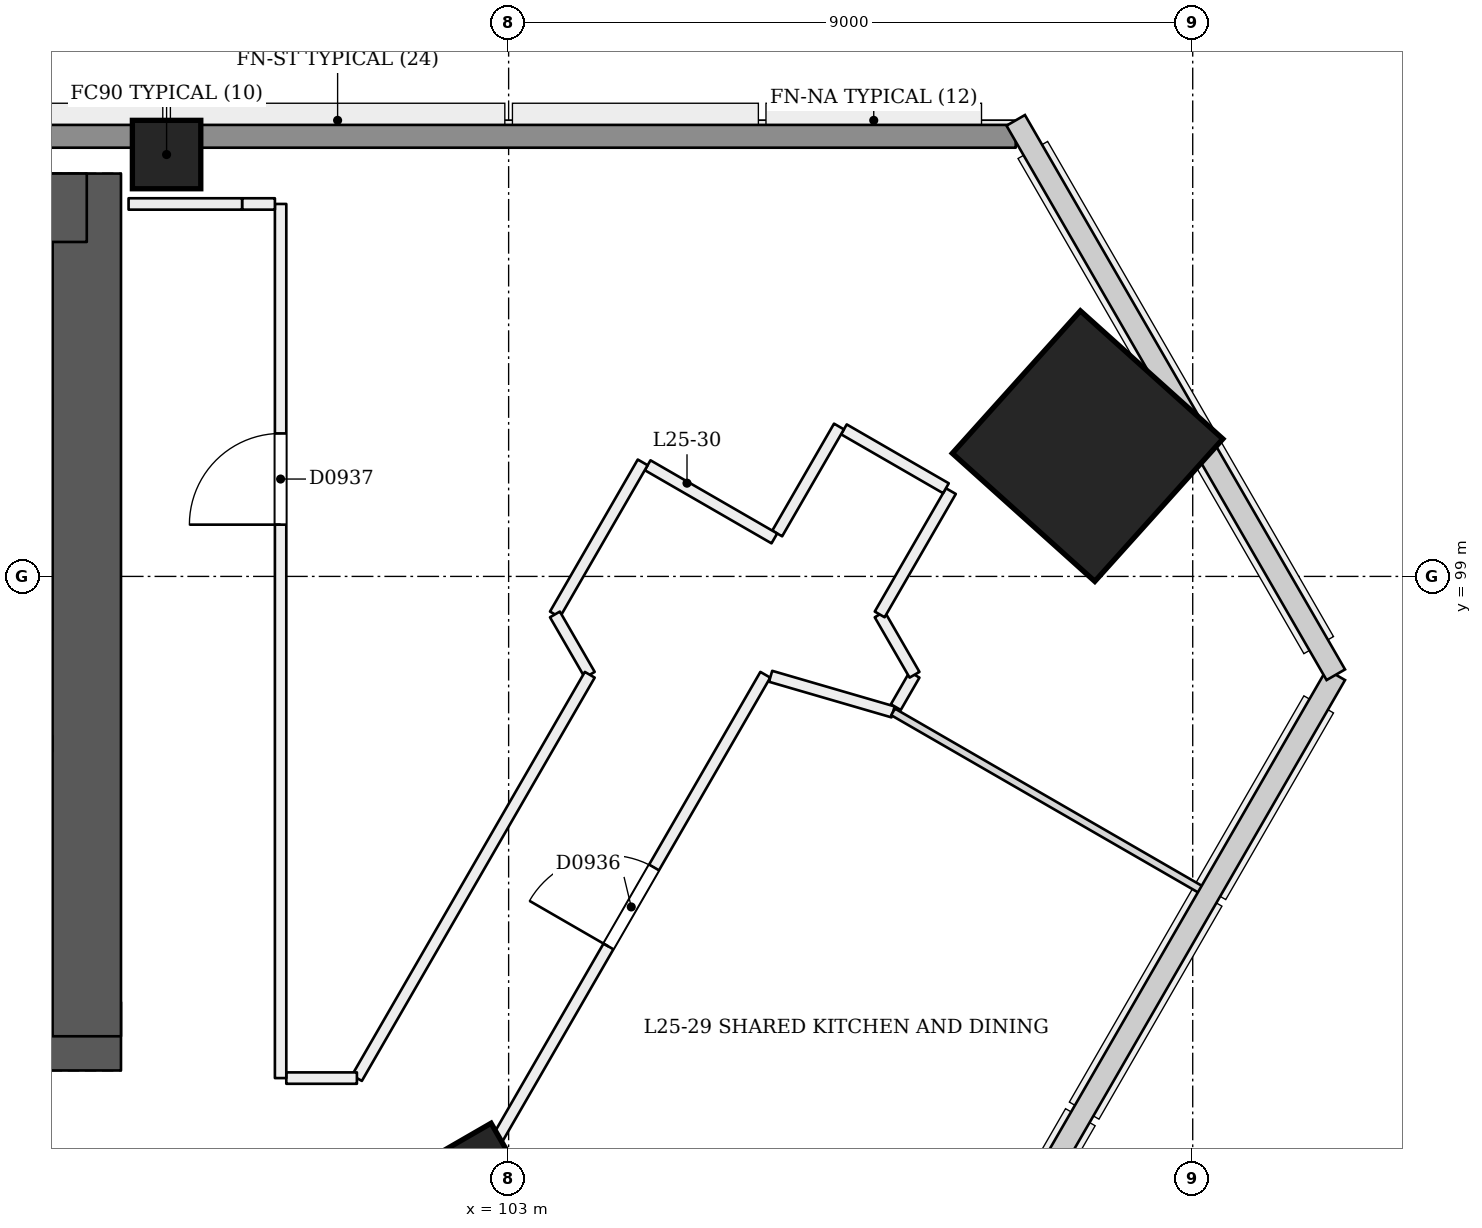
"""IFC4 building model, lengths in metres.
Left out: names, types, materials, properties, quantities, classifications, styles, units other than length and angle.
Written with IfcOpenShell. Run it as: python <this file> out.ifc"""

import sys

from ifc_helpers import new_model, si_unit, direction, frame, frame_2d, origin, origin_2d, place, context, subcontext, project, spatial, rectangle, extrude, element, fill, save


model = new_model("IFC4")
c1 = context("Model", 3, precision=1e-05, world=origin(), true_north=direction((0.0, 1.0)))
c2 = subcontext(c1, "Body", "Model", "MODEL_VIEW")
j1 = project(units=[si_unit("LENGTHUNIT", "METRE"), si_unit("PLANEANGLEUNIT", "RADIAN")], contexts=[c1])
p1 = place(None, origin())
s1 = spatial("IfcSite", under=j1, at=p1, CompositionType="ELEMENT")
p2 = place(p1, origin())
s2 = spatial("IfcBuilding", under=s1, at=p2, CompositionType="ELEMENT")
p3 = place(p2, frame((0.0, 0.0, 100.8)))
s3 = spatial("IfcBuildingStorey", under=s2, at=p3, CompositionType="ELEMENT", Elevation=100.8)
p4 = place(p3, frame((72.55, 92.95, 0.0), z_axis=(0.0, 0.0, 1.0), x_axis=(1.0, 0.0, 0.0)))
e1 = element("IfcWall", 1, at=p4, inside=s3, PredefinedType="SHEAR", context=c2, shape_type="SweptSolid", body=[
    extrude(rectangle(XDim=25.35, YDim=0.9, at=frame_2d((12.675, 0.0))), origin(), (0.0, 0.0, 1.0), 3.6),
])
p5 = place(p4, frame((1.25, 0.0, 0.0)))
e2 = element("IfcOpeningElement", 2, at=p5, cuts=e1, PredefinedType="OPENING", context=c2, shape_type="SweptSolid", body=[
    extrude(rectangle(XDim=1.2, YDim=2.1, at=frame_2d((0.6, 1.05))), frame((0.0, 0.46, 0.0), z_axis=(0.0, -1.0, 0.0), x_axis=(1.0, 0.0, 0.0)), (0.0, 0.0, 1.0), 0.921),
])
p6 = place(p4, frame((3.45, 0.0, 0.0)))
e3 = element("IfcOpeningElement", 3, at=p6, cuts=e1, PredefinedType="OPENING", context=c2, shape_type="SweptSolid", body=[
    extrude(rectangle(XDim=1.2, YDim=2.1, at=frame_2d((0.6, 1.05))), frame((0.0, 0.46, 0.0), z_axis=(0.0, -1.0, 0.0), x_axis=(1.0, 0.0, 0.0)), (0.0, 0.0, 1.0), 0.921),
])
p7 = place(p4, frame((13.45, 0.0, 0.0)))
e4 = element("IfcOpeningElement", 4, at=p7, cuts=e1, PredefinedType="OPENING", context=c2, shape_type="SweptSolid", body=[
    extrude(rectangle(XDim=1.2, YDim=2.1, at=frame_2d((0.6, 1.05))), frame((0.0, 0.46, 0.0), z_axis=(0.0, -1.0, 0.0), x_axis=(1.0, 0.0, 0.0)), (0.0, 0.0, 1.0), 0.921),
])
p8 = place(p4, frame((16.163, 0.0, 0.0)))
e5 = element("IfcOpeningElement", 5, at=p8, cuts=e1, PredefinedType="OPENING", context=c2, shape_type="SweptSolid", body=[
    extrude(rectangle(XDim=1.0, YDim=2.1, at=frame_2d((0.5, 1.05))), frame((0.0, 0.46, 0.0), z_axis=(0.0, -1.0, 0.0), x_axis=(1.0, 0.0, 0.0)), (0.0, 0.0, 1.0), 0.921),
])
p9 = place(p4, frame((20.05, 0.0, 0.0)))
e6 = element("IfcOpeningElement", 6, at=p9, cuts=e1, PredefinedType="OPENING", context=c2, shape_type="SweptSolid", body=[
    extrude(rectangle(XDim=1.0, YDim=2.1, at=frame_2d((0.5, 1.05))), frame((0.0, 0.46, 0.0), z_axis=(0.0, -1.0, 0.0), x_axis=(1.0, 0.0, 0.0)), (0.0, 0.0, 1.0), 0.921),
])
p10 = place(p4, frame((23.188, 0.0, 0.0)))
e7 = element("IfcOpeningElement", 7, at=p10, cuts=e1, PredefinedType="OPENING", context=c2, shape_type="SweptSolid", body=[
    extrude(rectangle(XDim=1.0, YDim=2.1, at=frame_2d((0.5, 1.05))), frame((0.0, 0.46, 0.0), z_axis=(0.0, -1.0, 0.0), x_axis=(1.0, 0.0, 0.0)), (0.0, 0.0, 1.0), 0.921),
])
p11 = place(p3, frame((97.45, 92.95, 0.0), z_axis=(0.0, 0.0, 1.0), x_axis=(0.0, 1.0, 0.0)))
e8 = element("IfcWall", 8, at=p11, inside=s3, PredefinedType="SHEAR", context=c2, shape_type="SweptSolid", body=[
    extrude(rectangle(XDim=11.35, YDim=0.9, at=frame_2d((5.675, 0.0))), origin(), (0.0, 0.0, 1.0), 3.6),
])
p12 = place(p3, frame((97.45, 103.85, 0.0), z_axis=(0.0, 0.0, 1.0), x_axis=(-1.0, 0.0, 0.0)))
e9 = element("IfcWall", 9, at=p12, inside=s3, PredefinedType="SHEAR", context=c2, shape_type="SweptSolid", body=[
    extrude(rectangle(XDim=25.35, YDim=0.9, at=frame_2d((12.675, 0.0))), origin(), (0.0, 0.0, 1.0), 3.6),
])
p13 = place(p3, frame((102.668, 91.281, -0.021), z_axis=(-0.02215519141, 0.038415882353, 0.999016199807), x_axis=(-0.50065279292, -0.865364153162, 0.02217348332)))
e10 = element("IfcColumn", 10, at=p13, inside=s3, PredefinedType="COLUMN", context=c2, shape_type="SweptSolid", body=[
    extrude(rectangle(XDim=0.7, YDim=0.7, at=origin_2d()), origin(), (0.0, 0.0, 1.0), 3.604),
])
p14 = place(p3, frame((110.651, 100.703, 0.0), z_axis=(-0.028403739082, 0.009219352065, 0.999554016126), x_axis=(0.500757442821, -0.865302642417, 0.022210819119)))
e11 = element("IfcColumn", 11, at=p14, inside=s3, PredefinedType="COLUMN", context=c2, shape_type="SweptSolid", body=[
    extrude(rectangle(XDim=2.52, YDim=2.52, at=origin_2d()), origin(), (0.0, 0.0, 1.0), 3.602),
])
p15 = place(p3, frame((98.5, 104.55, 0.0), z_axis=(0.0, 0.0, 1.0), x_axis=(1.0, 0.0, 0.0)))
e12 = element("IfcColumn", 12, at=p15, inside=s3, PredefinedType="COLUMN", context=c2, shape_type="SweptSolid", body=[
    extrude(rectangle(XDim=0.9, YDim=0.9, at=origin_2d()), origin(), (0.0, 0.0, 1.0), 3.6),
])
p16 = place(p3, frame((85.458, 61.474, 0.0), z_axis=(0.0, 0.0, 1.0), x_axis=(0.500000781663, 0.866024952491, 0.0)))
e13 = element("IfcWall", 13, at=p16, inside=s3, PredefinedType="PARTITIONING", context=c2, shape_type="SweptSolid", body=[
    extrude(rectangle(XDim=41.837, YDim=0.15, at=frame_2d((20.919, 0.0))), origin(), (0.0, 0.0, 1.0), 2.7),
])
p17 = place(p16, frame((0.253, 0.0, 0.0)))
e14 = element("IfcOpeningElement", 14, at=p17, cuts=e13, PredefinedType="OPENING", context=c2, shape_type="SweptSolid", body=[
    extrude(rectangle(XDim=1.2, YDim=2.1, at=frame_2d((0.6, 1.05))), frame((0.0, 0.085, 0.0), z_axis=(0.0, -1.0, 0.0), x_axis=(1.0, 0.0, 0.0)), (0.0, 0.0, 1.0), 0.171),
])
p18 = place(p16, frame((5.719, 0.0, 0.0)))
e15 = element("IfcOpeningElement", 15, at=p18, cuts=e13, PredefinedType="OPENING", context=c2, shape_type="SweptSolid", body=[
    extrude(rectangle(XDim=1.2, YDim=2.1, at=frame_2d((0.6, 1.05))), frame((0.0, 0.085, 0.0), z_axis=(0.0, -1.0, 0.0), x_axis=(1.0, 0.0, 0.0)), (0.0, 0.0, 1.0), 0.171),
])
p19 = place(p16, frame((13.669, 0.0, 0.0)))
e16 = element("IfcOpeningElement", 16, at=p19, cuts=e13, PredefinedType="OPENING", context=c2, shape_type="SweptSolid", body=[
    extrude(rectangle(XDim=1.0, YDim=2.1, at=frame_2d((0.5, 1.05))), frame((0.0, 0.085, 0.0), z_axis=(0.0, -1.0, 0.0), x_axis=(1.0, 0.0, 0.0)), (0.0, 0.0, 1.0), 0.171),
])
p20 = place(p16, frame((18.169, 0.0, 0.0)))
e17 = element("IfcOpeningElement", 17, at=p20, cuts=e13, PredefinedType="OPENING", context=c2, shape_type="SweptSolid", body=[
    extrude(rectangle(XDim=1.0, YDim=2.1, at=frame_2d((0.5, 1.05))), frame((0.0, 0.085, 0.0), z_axis=(0.0, -1.0, 0.0), x_axis=(1.0, 0.0, 0.0)), (0.0, 0.0, 1.0), 0.171),
])
p21 = place(p16, frame((21.639, 0.0, 0.0)))
e18 = element("IfcOpeningElement", 18, at=p21, cuts=e13, PredefinedType="OPENING", context=c2, shape_type="SweptSolid", body=[
    extrude(rectangle(XDim=1.0, YDim=2.1, at=frame_2d((0.5, 1.05))), frame((0.0, 0.085, 0.0), z_axis=(0.0, -1.0, 0.0), x_axis=(1.0, 0.0, 0.0)), (0.0, 0.0, 1.0), 0.171),
])
p22 = place(p16, frame((27.169, 0.0, 0.0)))
e19 = element("IfcOpeningElement", 19, at=p22, cuts=e13, PredefinedType="OPENING", context=c2, shape_type="SweptSolid", body=[
    extrude(rectangle(XDim=1.0, YDim=2.1, at=frame_2d((0.5, 1.05))), frame((0.0, 0.085, 0.0), z_axis=(0.0, -1.0, 0.0), x_axis=(1.0, 0.0, 0.0)), (0.0, 0.0, 1.0), 0.171),
])
p23 = place(p16, frame((30.639, 0.0, 0.0)))
e20 = element("IfcOpeningElement", 20, at=p23, cuts=e13, PredefinedType="OPENING", context=c2, shape_type="SweptSolid", body=[
    extrude(rectangle(XDim=1.0, YDim=2.1, at=frame_2d((0.5, 1.05))), frame((0.0, 0.085, 0.0), z_axis=(0.0, -1.0, 0.0), x_axis=(1.0, 0.0, 0.0)), (0.0, 0.0, 1.0), 0.171),
])
p24 = place(p16, frame((37.71, 0.0, 0.0)))
e21 = element("IfcOpeningElement", 21, at=p24, cuts=e13, PredefinedType="OPENING", context=c2, shape_type="SweptSolid", body=[
    extrude(rectangle(XDim=1.2, YDim=2.1, at=frame_2d((0.6, 1.05))), frame((0.0, 0.085, 0.0), z_axis=(0.0, -1.0, 0.0), x_axis=(1.0, 0.0, 0.0)), (0.0, 0.0, 1.0), 0.171),
])
p25 = place(p3, frame((106.447, 97.686, 0.0), z_axis=(0.0, 0.0, 1.0), x_axis=(0.96025063578, -0.279139242108, 0.0)))
e22 = element("IfcWall", 22, at=p25, inside=s3, PredefinedType="PARTITIONING", context=c2, shape_type="SweptSolid", body=[
    extrude(rectangle(XDim=1.677, YDim=0.15, at=frame_2d((0.839, 0.0))), origin(), (0.0, 0.0, 1.0), 3.1),
])
p26 = place(p3, frame((108.094, 97.281, 0.0), z_axis=(0.0, 0.0, 1.0), x_axis=(0.500037662692, 0.866003658127, 0.0)))
e23 = element("IfcWall", 23, at=p26, inside=s3, PredefinedType="PARTITIONING", context=c2, shape_type="SweptSolid", body=[
    extrude(rectangle(XDim=0.492, YDim=0.15, at=frame_2d((0.246, 0.0))), origin(), (0.0, 0.0, 1.0), 3.1),
])
p27 = place(p3, frame((108.34, 97.706, 0.0), z_axis=(0.0, 0.0, 1.0), x_axis=(-0.500006847747, 0.8660214502, 0.0)))
e24 = element("IfcWall", 24, at=p27, inside=s3, PredefinedType="PARTITIONING", context=c2, shape_type="SweptSolid", body=[
    extrude(rectangle(XDim=0.917, YDim=0.15, at=frame_2d((0.458, 0.0))), origin(), (0.0, 0.0, 1.0), 3.1),
])
p28 = place(p3, frame((107.882, 98.5, 0.0), z_axis=(0.0, 0.0, 1.0), x_axis=(0.499951854219, 0.86605319898, 0.0)))
e25 = element("IfcWall", 25, at=p28, inside=s3, PredefinedType="PARTITIONING", context=c2, shape_type="SweptSolid", body=[
    extrude(rectangle(XDim=1.873, YDim=0.15, at=frame_2d((0.937, 0.0))), origin(), (0.0, 0.0, 1.0), 3.1),
])
p29 = place(p3, frame((108.753, 100.16, 0.0), z_axis=(0.0, 0.0, 1.0), x_axis=(-0.865975732936, 0.500086022567, 0.0)))
e26 = element("IfcWall", 26, at=p29, inside=s3, PredefinedType="PARTITIONING", context=c2, shape_type="SweptSolid", body=[
    extrude(rectangle(XDim=1.55, YDim=0.15, at=frame_2d((0.775, 0.0))), origin(), (0.0, 0.0, 1.0), 3.1),
])
p30 = place(p3, frame((107.346, 100.972, 0.0), z_axis=(0.0, 0.0, 1.0), x_axis=(-0.500017246033, -0.866015446554, 0.0)))
e27 = element("IfcWall", 27, at=p30, inside=s3, PredefinedType="PARTITIONING", context=c2, shape_type="SweptSolid", body=[
    extrude(rectangle(XDim=1.625, YDim=0.15, at=frame_2d((0.812, 0.0))), origin(), (0.0, 0.0, 1.0), 3.1),
])
p31 = place(p3, frame((106.496, 99.5, 0.0), z_axis=(0.0, 0.0, 1.0), x_axis=(-0.866033512162, 0.499985955615, 0.0)))
e28 = element("IfcWall", 28, at=p31, inside=s3, PredefinedType="PARTITIONING", context=c2, shape_type="SweptSolid", body=[
    extrude(rectangle(XDim=1.925, YDim=0.15, at=frame_2d((0.962, 0.0))), origin(), (0.0, 0.0, 1.0), 3.1),
])
p32 = place(p3, frame((104.764, 100.5, 0.0), z_axis=(0.0, 0.0, 1.0), x_axis=(-0.500027479704, -0.866009537788, 0.0)))
e29 = element("IfcWall", 29, at=p32, inside=s3, PredefinedType="PARTITIONING", context=c2, shape_type="SweptSolid", body=[
    extrude(rectangle(XDim=2.309, YDim=0.15, at=frame_2d((1.155, 0.0))), origin(), (0.0, 0.0, 1.0), 3.1),
])
p33 = place(p3, frame((103.609, 98.5, 0.0), z_axis=(0.0, 0.0, 1.0), x_axis=(0.500006847747, -0.8660214502, 0.0)))
e30 = element("IfcWall", 30, at=p33, inside=s3, PredefinedType="PARTITIONING", context=c2, shape_type="SweptSolid", body=[
    extrude(rectangle(XDim=0.917, YDim=0.15, at=frame_2d((0.458, 0.0))), origin(), (0.0, 0.0, 1.0), 3.1),
])
p34 = place(p3, frame((104.067, 97.706, 0.0), z_axis=(0.0, 0.0, 1.0), x_axis=(-0.499978838982, -0.866037620759, 0.0)))
e31 = element("IfcWall", 31, at=p34, inside=s3, PredefinedType="PARTITIONING", context=c2, shape_type="SweptSolid", body=[
    extrude(rectangle(XDim=6.127, YDim=0.15, at=frame_2d((3.063, 0.0))), origin(), (0.0, 0.0, 1.0), 3.1),
])
p35 = place(p3, frame((101.004, 92.4, 0.0), z_axis=(0.0, 0.0, 1.0), x_axis=(-1.0, 0.0, 0.0)))
e32 = element("IfcWall", 32, at=p35, inside=s3, PredefinedType="PARTITIONING", context=c2, shape_type="SweptSolid", body=[
    extrude(rectangle(XDim=0.929, YDim=0.15, at=frame_2d((0.464, 0.0))), origin(), (0.0, 0.0, 1.0), 3.1),
])
p36 = place(p3, frame((100.0, 92.4, 0.0), z_axis=(0.0, 0.0, 1.0), x_axis=(0.0, 1.0, 0.0)))
e33 = element("IfcWall", 33, at=p36, inside=s3, PredefinedType="PARTITIONING", context=c2, shape_type="SweptSolid", body=[
    extrude(rectangle(XDim=11.5, YDim=0.15, at=frame_2d((5.75, 0.0))), origin(), (0.0, 0.0, 1.0), 2.6),
])
p37 = place(p36, frame((7.281, 0.0, 0.0)))
e34 = element("IfcOpeningElement", 34, at=p37, cuts=e33, PredefinedType="OPENING", context=c2, shape_type="SweptSolid", body=[
    extrude(rectangle(XDim=1.2, YDim=2.1, at=frame_2d((0.6, 1.05))), frame((0.0, 0.085, 0.0), z_axis=(0.0, -1.0, 0.0), x_axis=(1.0, 0.0, 0.0)), (0.0, 0.0, 1.0), 0.171),
])
p38 = place(p3, frame((99.925, 103.9, 0.0), z_axis=(0.0, 0.0, 1.0), x_axis=(-1.0, 0.0, 0.0)))
e35 = element("IfcWall", 35, at=p38, inside=s3, PredefinedType="PARTITIONING", context=c2, shape_type="SweptSolid", body=[
    extrude(rectangle(XDim=0.432, YDim=0.15, at=frame_2d((0.216, 0.0))), origin(), (0.0, 0.0, 1.0), 2.6),
])
p39 = place(p3, frame((99.493, 103.9, 0.0), z_axis=(0.0, 0.0, 1.0), x_axis=(-1.0, 0.0, 0.0)))
e36 = element("IfcWall", 36, at=p39, inside=s3, PredefinedType="PARTITIONING", context=c2, shape_type="SweptSolid", body=[
    extrude(rectangle(XDim=1.493, YDim=0.15, at=frame_2d((0.747, 0.0))), origin(), (0.0, 0.0, 1.0), 3.1),
])
p40 = place(p3, frame((112.146, 94.857, 0.0), z_axis=(0.0, 0.0, 1.0), x_axis=(-0.866028828302, 0.499994068514, 0.0)))
e37 = element("IfcWall", 37, at=p40, inside=s3, PredefinedType="PARTITIONING", context=c2, shape_type="SweptSolid", body=[
    extrude(rectangle(XDim=4.72, YDim=0.1, at=frame_2d((2.36, 0.0))), origin(), (0.0, 0.0, 1.0), 2.6),
])
p41 = place(p3, frame((60.329, 104.79, 0.0), z_axis=(0.0, 0.0, 1.0), x_axis=(1.0, 0.0, 0.0)))
e38 = element("IfcWall", 38, at=p41, inside=s3, PredefinedType="SOLIDWALL", context=c2, shape_type="SweptSolid", body=[
    extrude(rectangle(XDim=49.343, YDim=0.3, at=frame_2d((24.671, 0.0))), origin(), (0.0, 0.0, 1.0), 2.6),
])
p42 = place(p24, origin())
e39 = element("IfcDoor", 39, at=p42, inside=s3, OperationType="SINGLE_SWING_LEFT", PredefinedType="NOTDEFINED", context=c2, shape_type="SweptSolid", body=[
    extrude(rectangle(XDim=1.2, YDim=2.1, at=frame_2d((0.6, 1.05))), frame((0.0, 0.025, 0.0), z_axis=(0.0, -1.0, 0.0), x_axis=(1.0, 0.0, 0.0)), (0.0, 0.0, 1.0), 0.05),
])
fill(e21, e39)
p43 = place(p37, origin())
e40 = element("IfcDoor", 40, at=p43, inside=s3, OperationType="SINGLE_SWING_LEFT", PredefinedType="NOTDEFINED", context=c2, shape_type="SweptSolid", body=[
    extrude(rectangle(XDim=1.2, YDim=2.1, at=frame_2d((0.6, 1.05))), frame((0.0, 0.025, 0.0), z_axis=(0.0, -1.0, 0.0), x_axis=(1.0, 0.0, 0.0)), (0.0, 0.0, 1.0), 0.05),
])
fill(e34, e40)
save(model, sys.argv[1])
